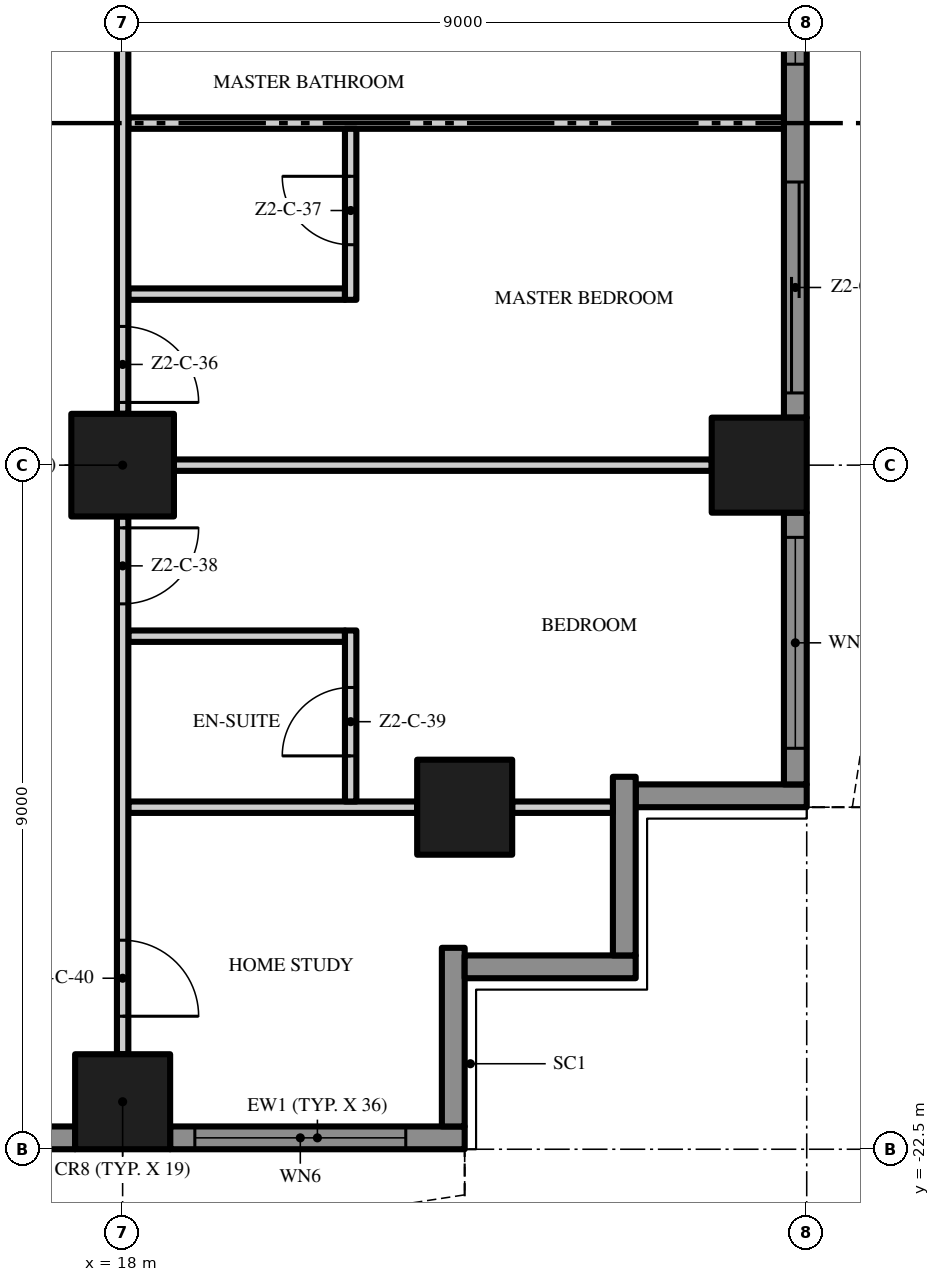
"""IFC4 building model, lengths in metres.
Left out: names, types, materials, properties, quantities, classifications, styles, units other than length and angle.
Written with IfcOpenShell. Run it as: python <this file> out.ifc"""

import sys

from ifc_helpers import new_model, si_unit, direction, frame, frame_2d, origin, origin_2d, place, context, subcontext, project, spatial, polyline, rectangle, outline, extrude, element, fill, save


model = new_model("IFC4")
c1 = context("Model", 3, precision=1e-05, world=origin(), true_north=direction((0.0, 1.0)))
c2 = subcontext(c1, "Body", "Model", "MODEL_VIEW")
j1 = project(units=[si_unit("LENGTHUNIT", "METRE"), si_unit("PLANEANGLEUNIT", "RADIAN")], contexts=[c1])
p1 = place(None, origin())
s1 = spatial("IfcSite", under=j1, at=p1, CompositionType="ELEMENT")
p2 = place(p1, origin())
s2 = spatial("IfcBuilding", under=s1, at=p2, CompositionType="ELEMENT")
p3 = place(p2, frame((0.0, 0.0, 99.8)))
s3 = spatial("IfcBuildingStorey", under=s2, at=p3, CompositionType="ELEMENT", Elevation=99.8)
p4 = place(p3, frame((18.0, -13.5, 0.0), z_axis=(0.0, 0.0, 1.0), x_axis=(1.0, 0.0, 0.0)))
e1 = element("IfcColumn", 1, at=p4, inside=s3, PredefinedType="COLUMN", context=c2, shape_type="SweptSolid", body=[
    extrude(rectangle(XDim=1.35, YDim=1.35, at=origin_2d()), origin(), (0.0, 0.0, 1.0), 3.5),
])
for number, where, z_axis, x_axis in (
    (2, (18.0, -21.875, 0.0), (0.0, 0.0, 1.0), (1.0, 0.0, 0.0)),
    (3, (26.375, -13.5, 0.0), (0.0, 0.0, 1.0), (1.0, 0.0, 0.0)),
    (4, (22.5, -18.0, 0.0), (0.0, 0.0, 1.0), (1.0, 0.0, 0.0)),
):
    element("IfcColumn", number, at=place(p3, frame(where, z_axis=z_axis, x_axis=x_axis)), inside=s3, PredefinedType="COLUMN", context=c2, shape_type="SweptSolid", body=[
        extrude(rectangle(XDim=1.25, YDim=1.25, at=origin_2d()), origin(), (0.0, 0.0, 1.0), 3.5),
    ])
p5 = place(p3, frame((17.375, -22.35, 0.0), z_axis=(0.0, 0.0, 1.0), x_axis=(-1.0, 0.0, 0.0)))
e5 = element("IfcWall", 5, at=p5, inside=s3, PredefinedType="SOLIDWALL", context=c2, shape_type="SweptSolid", body=[
    extrude(rectangle(XDim=7.75, YDim=0.3, at=frame_2d((3.875, 0.0))), origin(), (0.0, 0.0, 1.0), 3.5),
])
p6 = place(p5, frame((4.65, 0.0, 0.45)))
e6 = element("IfcOpeningElement", 6, at=p6, cuts=e5, PredefinedType="OPENING", context=c2, shape_type="SweptSolid", body=[
    extrude(rectangle(XDim=2.775, YDim=2.65, at=frame_2d((1.387, 1.325))), frame((0.0, 0.16, 0.0), z_axis=(0.0, -1.0, 0.0), x_axis=(1.0, 0.0, 0.0)), (0.0, 0.0, 1.0), 0.32),
])
p7 = place(p5, frame((0.325, 0.0, 0.0)))
e7 = element("IfcOpeningElement", 7, at=p7, cuts=e5, PredefinedType="OPENING", context=c2, shape_type="SweptSolid", body=[
    extrude(rectangle(XDim=2.775, YDim=2.4, at=frame_2d((1.387, 1.2))), frame((0.0, 0.16, 0.0), z_axis=(0.0, -1.0, 0.0), x_axis=(1.0, 0.0, 0.0)), (0.0, 0.0, 1.0), 0.32),
])
p8 = place(p3, frame((22.5, -22.35, 0.0), z_axis=(0.0, 0.0, 1.0), x_axis=(-1.0, 0.0, 0.0)))
e8 = element("IfcWall", 8, at=p8, inside=s3, PredefinedType="SOLIDWALL", context=c2, shape_type="SweptSolid", body=[
    extrude(rectangle(XDim=3.875, YDim=0.3, at=frame_2d((1.938, 0.0))), origin(), (0.0, 0.0, 1.0), 3.5),
])
p9 = place(p8, frame((0.775, 0.0, 0.45)))
e9 = element("IfcOpeningElement", 9, at=p9, cuts=e8, PredefinedType="OPENING", context=c2, shape_type="SweptSolid", body=[
    extrude(rectangle(XDim=2.775, YDim=2.65, at=frame_2d((1.387, 1.325))), frame((0.0, 0.16, 0.0), z_axis=(0.0, -1.0, 0.0), x_axis=(1.0, 0.0, 0.0)), (0.0, 0.0, 1.0), 0.32),
])
p10 = place(p3, frame((22.35, -19.85, 0.0), z_axis=(0.0, 0.0, 1.0), x_axis=(0.0, -1.0, 0.0)))
e10 = element("IfcWall", 10, at=p10, inside=s3, PredefinedType="SOLIDWALL", context=c2, shape_type="SweptSolid", body=[
    extrude(rectangle(XDim=2.35, YDim=0.3, at=frame_2d((1.175, 0.0))), origin(), (0.0, 0.0, 1.0), 3.5),
])
p11 = place(p3, frame((24.75, -20.1, 0.0), z_axis=(0.0, 0.0, 1.0), x_axis=(-1.0, 0.0, 0.0)))
e11 = element("IfcWall", 11, at=p11, inside=s3, PredefinedType="SOLIDWALL", context=c2, shape_type="SweptSolid", body=[
    extrude(rectangle(XDim=2.25, YDim=0.3, at=frame_2d((1.125, 0.0))), origin(), (0.0, 0.0, 1.0), 3.5),
])
p12 = place(p3, frame((24.6, -17.6, 0.0), z_axis=(0.0, 0.0, 1.0), x_axis=(0.0, -1.0, 0.0)))
e12 = element("IfcWall", 12, at=p12, inside=s3, PredefinedType="SOLIDWALL", context=c2, shape_type="SweptSolid", body=[
    extrude(rectangle(XDim=2.35, YDim=0.3, at=frame_2d((1.175, 0.0))), origin(), (0.0, 0.0, 1.0), 3.5),
])
p13 = place(p3, frame((27.0, -17.85, 0.0), z_axis=(0.0, 0.0, 1.0), x_axis=(-1.0, 0.0, 0.0)))
e13 = element("IfcWall", 13, at=p13, inside=s3, PredefinedType="SOLIDWALL", context=c2, shape_type="SweptSolid", body=[
    extrude(rectangle(XDim=2.25, YDim=0.3, at=frame_2d((1.125, 0.0))), origin(), (0.0, 0.0, 1.0), 3.5),
])
p14 = place(p3, frame((26.85, -14.125, 0.0), z_axis=(0.0, 0.0, 1.0), x_axis=(0.0, -1.0, 0.0)))
e14 = element("IfcWall", 14, at=p14, inside=s3, PredefinedType="SOLIDWALL", context=c2, shape_type="SweptSolid", body=[
    extrude(rectangle(XDim=3.575, YDim=0.3, at=frame_2d((1.788, 0.0))), origin(), (0.0, 0.0, 1.0), 3.5),
])
p15 = place(p14, frame((0.325, 0.0, 0.45)))
e15 = element("IfcOpeningElement", 15, at=p15, cuts=e14, PredefinedType="OPENING", context=c2, shape_type="SweptSolid", body=[
    extrude(rectangle(XDim=2.775, YDim=2.65, at=frame_2d((1.387, 1.325))), frame((0.0, 0.16, 0.0), z_axis=(0.0, -1.0, 0.0), x_axis=(1.0, 0.0, 0.0)), (0.0, 0.0, 1.0), 0.32),
])
p16 = place(p3, frame((26.85, -5.125, 0.0), z_axis=(0.0, 0.0, 1.0), x_axis=(0.0, -1.0, 0.0)))
e16 = element("IfcWall", 16, at=p16, inside=s3, PredefinedType="SOLIDWALL", context=c2, shape_type="SweptSolid", body=[
    extrude(rectangle(XDim=7.75, YDim=0.3, at=frame_2d((3.875, 0.0))), origin(), (0.0, 0.0, 1.0), 3.5),
])
p17 = place(p16, frame((4.65, 0.0, 0.0)))
e17 = element("IfcOpeningElement", 17, at=p17, cuts=e16, PredefinedType="OPENING", context=c2, shape_type="SweptSolid", body=[
    extrude(rectangle(XDim=2.775, YDim=2.4, at=frame_2d((1.387, 1.2))), frame((0.0, 0.16, 0.0), z_axis=(0.0, -1.0, 0.0), x_axis=(1.0, 0.0, 0.0)), (0.0, 0.0, 1.0), 0.32),
])
p18 = place(p16, frame((0.325, 0.0, 0.45)))
e18 = element("IfcOpeningElement", 18, at=p18, cuts=e16, PredefinedType="OPENING", context=c2, shape_type="SweptSolid", body=[
    extrude(rectangle(XDim=2.775, YDim=2.65, at=frame_2d((1.387, 1.325))), frame((0.0, 0.16, 0.0), z_axis=(0.0, -1.0, 0.0), x_axis=(1.0, 0.0, 0.0)), (0.0, 0.0, 1.0), 0.32),
])
p19 = place(p3, origin())
e19 = element("IfcWall", 19, at=p19, inside=s3, PredefinedType="USERDEFINED", context=c2, shape_type="SweptSolid", body=[
    extrude(outline(polyline([(-22.5, -23.1), (-21.0, -23.329), (-19.5, -23.929), (-18.0, -24.671), (-16.5, -25.271), (-15.0, -25.5), (-13.5, -25.271), (-12.0, -24.671), (-10.5, -23.929), (-9.0, -23.329), (-7.5, -23.1), (-6.0, -23.329), (-4.5, -23.929), (-3.0, -24.671), (-1.5, -25.271), (0.0, -25.5), (1.5, -25.271), (3.0, -24.671), (4.5, -23.929), (6.0, -23.329), (7.5, -23.1), (9.0, -23.329), (10.5, -23.929), (12.0, -24.671), (13.5, -25.271), (15.0, -25.5), (16.5, -25.271), (18.0, -24.671), (19.5, -23.929), (21.0, -23.329), (22.5, -23.1), (22.462, -22.853), (20.934, -23.086), (19.398, -23.701), (17.898, -24.442), (16.434, -25.028), (15.0, -25.247), (13.566, -25.028), (12.102, -24.442), (10.602, -23.701), (9.066, -23.086), (7.5, -22.847), (5.934, -23.086), (4.398, -23.701), (2.898, -24.442), (1.434, -25.028), (0.0, -25.247), (-1.434, -25.028), (-2.898, -24.442), (-4.398, -23.701), (-5.934, -23.086), (-7.5, -22.847), (-9.066, -23.086), (-10.602, -23.701), (-12.102, -24.442), (-13.566, -25.028), (-15.0, -25.247), (-16.434, -25.028), (-17.898, -24.442), (-19.398, -23.701), (-20.934, -23.086), (-22.462, -22.853), (-22.5, -23.1)])), origin(), (0.0, 0.0, 1.0), 0.9),
])
p20 = place(p3, origin())
e20 = element("IfcWall", 20, at=p20, inside=s3, PredefinedType="USERDEFINED", context=c2, shape_type="SweptSolid", body=[
    extrude(outline(polyline([(27.6, -18.0), (27.829, -16.5), (28.429, -15.0), (29.171, -13.5), (29.771, -12.0), (30.0, -10.5), (29.771, -9.0), (29.171, -7.5), (28.429, -6.0), (27.829, -4.5), (27.6, -3.0), (27.829, -1.5), (28.429, 0.0), (29.171, 1.5), (29.771, 3.0), (30.0, 4.5), (29.771, 6.0), (29.171, 7.5), (28.429, 9.0), (27.829, 10.5), (27.6, 12.0), (27.829, 13.5), (28.429, 15.0), (29.171, 16.5), (29.771, 18.0), (29.539, 18.093), (28.942, 16.602), (28.201, 15.102), (27.586, 13.566), (27.347, 12.0), (27.586, 10.434), (28.201, 8.898), (28.942, 7.398), (29.528, 5.934), (29.747, 4.5), (29.528, 3.066), (28.942, 1.602), (28.201, 0.102), (27.586, -1.434), (27.347, -3.0), (27.586, -4.566), (28.201, -6.102), (28.942, -7.602), (29.528, -9.066), (29.747, -10.5), (29.528, -11.934), (28.942, -13.398), (28.201, -14.898), (27.586, -16.434), (27.353, -17.962), (27.6, -18.0)])), origin(), (0.0, 0.0, 1.0), 0.9),
])
p21 = place(p3, frame((18.075, -18.0, 0.0), z_axis=(0.0, 0.0, 1.0), x_axis=(1.0, 0.0, 0.0)))
e21 = element("IfcWall", 21, at=p21, inside=s3, PredefinedType="PARTITIONING", context=c2, shape_type="SweptSolid", body=[
    extrude(rectangle(XDim=3.8, YDim=0.15, at=frame_2d((1.9, 0.0))), origin(), (0.0, 0.0, 1.0), 3.5),
])
p22 = place(p3, frame((23.125, -18.0, 0.0), z_axis=(0.0, 0.0, 1.0), x_axis=(1.0, 0.0, 0.0)))
e22 = element("IfcWall", 22, at=p22, inside=s3, PredefinedType="PARTITIONING", context=c2, shape_type="SweptSolid", body=[
    extrude(rectangle(XDim=1.325, YDim=0.15, at=frame_2d((0.662, 0.0))), origin(), (0.0, 0.0, 1.0), 3.5),
])
p23 = place(p3, frame((18.075, -15.75, 0.0), z_axis=(0.0, 0.0, 1.0), x_axis=(1.0, 0.0, 0.0)))
e23 = element("IfcWall", 23, at=p23, inside=s3, PredefinedType="PARTITIONING", context=c2, shape_type="SweptSolid", body=[
    extrude(rectangle(XDim=2.85, YDim=0.15, at=frame_2d((1.425, 0.0))), origin(), (0.0, 0.0, 1.0), 3.5),
])
p24 = place(p3, frame((18.675, -13.5, 0.0), z_axis=(0.0, 0.0, 1.0), x_axis=(1.0, 0.0, 0.0)))
e24 = element("IfcWall", 24, at=p24, inside=s3, PredefinedType="PARTITIONING", context=c2, shape_type="SweptSolid", body=[
    extrude(rectangle(XDim=7.075, YDim=0.15, at=frame_2d((3.538, 0.0))), origin(), (0.0, 0.0, 1.0), 3.5),
])
p25 = place(p3, frame((18.075, -11.25, 0.0), z_axis=(0.0, 0.0, 1.0), x_axis=(1.0, 0.0, 0.0)))
e25 = element("IfcWall", 25, at=p25, inside=s3, PredefinedType="PARTITIONING", context=c2, shape_type="SweptSolid", body=[
    extrude(rectangle(XDim=2.85, YDim=0.15, at=frame_2d((1.425, 0.0))), origin(), (0.0, 0.0, 1.0), 3.5),
])
p26 = place(p3, frame((18.075, -9.0, 0.0), z_axis=(0.0, 0.0, 1.0), x_axis=(1.0, 0.0, 0.0)))
e26 = element("IfcWall", 26, at=p26, inside=s3, PredefinedType="PARTITIONING", context=c2, shape_type="SweptSolid", body=[
    extrude(rectangle(XDim=8.625, YDim=0.15, at=frame_2d((4.312, 0.0))), origin(), (0.0, 0.0, 1.0), 3.5),
])
p27 = place(p3, frame((18.0, -14.175, 0.0), z_axis=(0.0, 0.0, 1.0), x_axis=(0.0, -1.0, 0.0)))
e27 = element("IfcWall", 27, at=p27, inside=s3, PredefinedType="PARTITIONING", context=c2, shape_type="SweptSolid", body=[
    extrude(rectangle(XDim=7.075, YDim=0.15, at=frame_2d((3.538, 0.0))), origin(), (0.0, 0.0, 1.0), 3.5),
])
p28 = place(p27, frame((0.15, 0.0, 0.0)))
e28 = element("IfcOpeningElement", 28, at=p28, cuts=e27, PredefinedType="OPENING", context=c2, shape_type="SweptSolid", body=[
    extrude(rectangle(XDim=1.0, YDim=2.4, at=frame_2d((0.5, 1.2))), frame((0.0, 0.085, 0.0), z_axis=(0.0, -1.0, 0.0), x_axis=(1.0, 0.0, 0.0)), (0.0, 0.0, 1.0), 0.17),
])
p29 = place(p27, frame((5.575, 0.0, 0.0)))
e29 = element("IfcOpeningElement", 29, at=p29, cuts=e27, PredefinedType="OPENING", context=c2, shape_type="SweptSolid", body=[
    extrude(rectangle(XDim=1.0, YDim=2.4, at=frame_2d((0.5, 1.2))), frame((0.0, 0.085, 0.0), z_axis=(0.0, -1.0, 0.0), x_axis=(1.0, 0.0, 0.0)), (0.0, 0.0, 1.0), 0.17),
])
p30 = place(p3, frame((18.0, -5.175, 0.0), z_axis=(0.0, 0.0, 1.0), x_axis=(0.0, -1.0, 0.0)))
e30 = element("IfcWall", 30, at=p30, inside=s3, PredefinedType="PARTITIONING", context=c2, shape_type="SweptSolid", body=[
    extrude(rectangle(XDim=7.65, YDim=0.15, at=frame_2d((3.825, 0.0))), origin(), (0.0, 0.0, 1.0), 3.5),
])
p31 = place(p30, frame((0.15, 0.0, 0.0)))
e31 = element("IfcOpeningElement", 31, at=p31, cuts=e30, PredefinedType="OPENING", context=c2, shape_type="SweptSolid", body=[
    extrude(rectangle(XDim=1.8, YDim=2.4, at=frame_2d((0.9, 1.2))), frame((0.0, 0.085, 0.0), z_axis=(0.0, -1.0, 0.0), x_axis=(1.0, 0.0, 0.0)), (0.0, 0.0, 1.0), 0.17),
])
p32 = place(p30, frame((6.5, 0.0, 0.0)))
e32 = element("IfcOpeningElement", 32, at=p32, cuts=e30, PredefinedType="OPENING", context=c2, shape_type="SweptSolid", body=[
    extrude(rectangle(XDim=1.0, YDim=2.4, at=frame_2d((0.5, 1.2))), frame((0.0, 0.085, 0.0), z_axis=(0.0, -1.0, 0.0), x_axis=(1.0, 0.0, 0.0)), (0.0, 0.0, 1.0), 0.17),
])
p33 = place(p3, frame((21.0, -17.925, 0.0), z_axis=(0.0, 0.0, 1.0), x_axis=(0.0, 1.0, 0.0)))
e33 = element("IfcWall", 33, at=p33, inside=s3, PredefinedType="PARTITIONING", context=c2, shape_type="SweptSolid", body=[
    extrude(rectangle(XDim=2.25, YDim=0.15, at=frame_2d((1.125, 0.0))), origin(), (0.0, 0.0, 1.0), 3.5),
])
p34 = place(p33, frame((0.6, 0.0, 0.0)))
e34 = element("IfcOpeningElement", 34, at=p34, cuts=e33, PredefinedType="OPENING", context=c2, shape_type="SweptSolid", body=[
    extrude(rectangle(XDim=0.9, YDim=2.1, at=frame_2d((0.45, 1.05))), frame((0.0, 0.085, 0.0), z_axis=(0.0, -1.0, 0.0), x_axis=(1.0, 0.0, 0.0)), (0.0, 0.0, 1.0), 0.17),
])
p35 = place(p3, frame((21.0, -11.325, 0.0), z_axis=(0.0, 0.0, 1.0), x_axis=(0.0, 1.0, 0.0)))
e35 = element("IfcWall", 35, at=p35, inside=s3, PredefinedType="PARTITIONING", context=c2, shape_type="SweptSolid", body=[
    extrude(rectangle(XDim=2.25, YDim=0.15, at=frame_2d((1.125, 0.0))), origin(), (0.0, 0.0, 1.0), 3.5),
])
p36 = place(p35, frame((0.725, 0.0, 0.0)))
e36 = element("IfcOpeningElement", 36, at=p36, cuts=e35, PredefinedType="OPENING", context=c2, shape_type="SweptSolid", body=[
    extrude(rectangle(XDim=0.9, YDim=2.1, at=frame_2d((0.45, 1.05))), frame((0.0, 0.085, 0.0), z_axis=(0.0, -1.0, 0.0), x_axis=(1.0, 0.0, 0.0)), (0.0, 0.0, 1.0), 0.17),
])
p37 = place(p9, origin())
e37 = element("IfcWindow", 37, at=p37, inside=s3, PartitioningType="SINGLE_PANEL", PredefinedType="WINDOW", context=c2, shape_type="SweptSolid", body=[
    extrude(rectangle(XDim=2.775, YDim=2.65, at=frame_2d((1.387, 1.325))), frame((0.0, 0.03, 0.0), z_axis=(0.0, -1.0, 0.0), x_axis=(1.0, 0.0, 0.0)), (0.0, 0.0, 1.0), 0.06),
])
fill(e9, e37)
p38 = place(p15, origin())
e38 = element("IfcWindow", 38, at=p38, inside=s3, PartitioningType="SINGLE_PANEL", PredefinedType="WINDOW", context=c2, shape_type="SweptSolid", body=[
    extrude(rectangle(XDim=2.775, YDim=2.65, at=frame_2d((1.387, 1.325))), frame((0.0, 0.03, 0.0), z_axis=(0.0, -1.0, 0.0), x_axis=(1.0, 0.0, 0.0)), (0.0, 0.0, 1.0), 0.06),
])
fill(e15, e38)
p39 = place(p17, origin())
e39 = element("IfcDoor", 39, at=p39, inside=s3, OperationType="SINGLE_SWING_LEFT", PredefinedType="DOOR", context=c2, shape_type="SweptSolid", body=[
    extrude(rectangle(XDim=2.775, YDim=2.4, at=frame_2d((1.387, 1.2))), frame((0.0, 0.025, 0.0), z_axis=(0.0, -1.0, 0.0), x_axis=(1.0, 0.0, 0.0)), (0.0, 0.0, 1.0), 0.05),
])
fill(e17, e39)
p40 = place(p18, origin())
e40 = element("IfcWindow", 40, at=p40, inside=s3, PartitioningType="SINGLE_PANEL", PredefinedType="WINDOW", context=c2, shape_type="SweptSolid", body=[
    extrude(rectangle(XDim=2.775, YDim=2.65, at=frame_2d((1.387, 1.325))), frame((0.0, 0.03, 0.0), z_axis=(0.0, -1.0, 0.0), x_axis=(1.0, 0.0, 0.0)), (0.0, 0.0, 1.0), 0.06),
])
fill(e18, e40)
p41 = place(p32, origin())
e41 = element("IfcDoor", 41, at=p41, inside=s3, OperationType="SINGLE_SWING_RIGHT", PredefinedType="DOOR", context=c2, shape_type="SweptSolid", body=[
    extrude(rectangle(XDim=1.0, YDim=2.4, at=frame_2d((0.5, 1.2))), frame((0.0, 0.025, 0.0), z_axis=(0.0, -1.0, 0.0), x_axis=(1.0, 0.0, 0.0)), (0.0, 0.0, 1.0), 0.05),
])
fill(e32, e41)
p42 = place(p36, origin())
e42 = element("IfcDoor", 42, at=p42, inside=s3, OperationType="SINGLE_SWING_RIGHT", PredefinedType="DOOR", context=c2, shape_type="SweptSolid", body=[
    extrude(rectangle(XDim=0.9, YDim=2.1, at=frame_2d((0.45, 1.05))), frame((0.0, 0.025, 0.0), z_axis=(0.0, -1.0, 0.0), x_axis=(1.0, 0.0, 0.0)), (0.0, 0.0, 1.0), 0.05),
])
fill(e36, e42)
p43 = place(p28, origin())
e43 = element("IfcDoor", 43, at=p43, inside=s3, OperationType="SINGLE_SWING_LEFT", PredefinedType="DOOR", context=c2, shape_type="SweptSolid", body=[
    extrude(rectangle(XDim=1.0, YDim=2.4, at=frame_2d((0.5, 1.2))), frame((0.0, 0.025, 0.0), z_axis=(0.0, -1.0, 0.0), x_axis=(1.0, 0.0, 0.0)), (0.0, 0.0, 1.0), 0.05),
])
fill(e28, e43)
p44 = place(p34, origin())
e44 = element("IfcDoor", 44, at=p44, inside=s3, OperationType="SINGLE_SWING_LEFT", PredefinedType="DOOR", context=c2, shape_type="SweptSolid", body=[
    extrude(rectangle(XDim=0.9, YDim=2.1, at=frame_2d((0.45, 1.05))), frame((0.0, 0.025, 0.0), z_axis=(0.0, -1.0, 0.0), x_axis=(1.0, 0.0, 0.0)), (0.0, 0.0, 1.0), 0.05),
])
fill(e34, e44)
p45 = place(p29, origin())
e45 = element("IfcDoor", 45, at=p45, inside=s3, OperationType="SINGLE_SWING_RIGHT", PredefinedType="DOOR", context=c2, shape_type="SweptSolid", body=[
    extrude(rectangle(XDim=1.0, YDim=2.4, at=frame_2d((0.5, 1.2))), frame((0.0, 0.025, 0.0), z_axis=(0.0, -1.0, 0.0), x_axis=(1.0, 0.0, 0.0)), (0.0, 0.0, 1.0), 0.05),
])
fill(e29, e45)
save(model, sys.argv[1])
